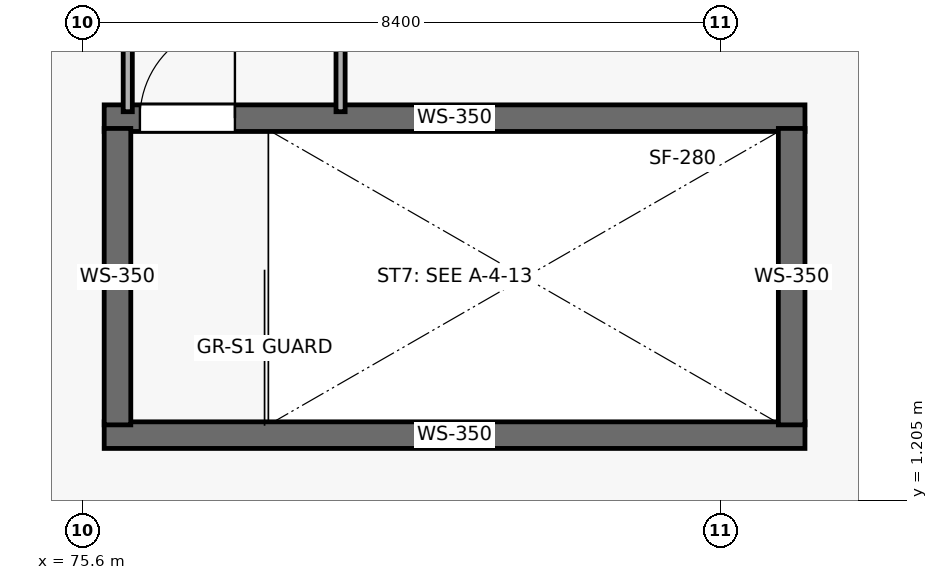
"""IFC4 building model, lengths in metres.
Left out: names, types, materials, properties, quantities, classifications, styles, units other than length and angle.
Written with IfcOpenShell. Run it as: python <this file> out.ifc"""

import sys

from ifc_helpers import new_model, si_unit, direction, frame, frame_2d, origin, place, context, subcontext, project, spatial, rectangle, extrude, element, fill, save


model = new_model("IFC4")
c1 = context("Model", 3, precision=1e-05, world=origin(), true_north=direction((0.0, 1.0)))
c2 = subcontext(c1, "Body", "Model", "MODEL_VIEW")
j1 = project(units=[si_unit("LENGTHUNIT", "METRE"), si_unit("PLANEANGLEUNIT", "RADIAN")], contexts=[c1])
p1 = place(None, origin())
s1 = spatial("IfcSite", under=j1, at=p1, CompositionType="ELEMENT")
p2 = place(p1, origin())
s2 = spatial("IfcBuilding", under=s1, at=p2, CompositionType="ELEMENT")
p3 = place(p2, frame((0.0, 0.0, 5.4)))
s3 = spatial("IfcBuildingStorey", under=s2, at=p3, CompositionType="ELEMENT", Elevation=5.4)
p4 = place(p3, frame((75.89, 2.065, 0.0), z_axis=(0.0, 0.0, 1.0), x_axis=(1.0, 0.0, 0.0)))
e1 = element("IfcWall", 1, at=p4, inside=s3, PredefinedType="SHEAR", context=c2, shape_type="SweptSolid", body=[
    extrude(rectangle(XDim=9.22, YDim=0.35, at=frame_2d((4.61, 0.0))), origin(), (0.0, 0.0, 1.0), 4.52),
])
p5 = place(p3, frame((85.11, 6.235, 0.0), z_axis=(0.0, 0.0, 1.0), x_axis=(-1.0, 0.0, 0.0)))
e2 = element("IfcWall", 2, at=p5, inside=s3, PredefinedType="SHEAR", context=c2, shape_type="SweptSolid", body=[
    extrude(rectangle(XDim=9.22, YDim=0.35, at=frame_2d((4.61, 0.0))), origin(), (0.0, 0.0, 1.0), 4.52),
])
p6 = place(p5, frame((7.5, 0.0, 0.0)))
e3 = element("IfcOpeningElement", 3, at=p6, cuts=e2, PredefinedType="OPENING", context=c2, shape_type="SweptSolid", body=[
    extrude(rectangle(XDim=1.25, YDim=2.2, at=frame_2d((0.625, 1.1))), frame((0.0, 0.185, 0.0), z_axis=(0.0, -1.0, 0.0), x_axis=(1.0, 0.0, 0.0)), (0.0, 0.0, 1.0), 0.37),
])
for number, where, z_axis, x_axis in (
    (4, (76.065, 2.2, 0.0), (0.0, 0.0, 1.0), (0.0, 1.0, 0.0)),
    (5, (84.935, 6.1, 0.0), (0.0, 0.0, 1.0), (0.0, -1.0, 0.0)),
):
    element("IfcWall", number, at=place(p3, frame(where, z_axis=z_axis, x_axis=x_axis)), inside=s3, PredefinedType="SHEAR", context=c2, shape_type="SweptSolid", body=[
        extrude(rectangle(XDim=3.9, YDim=0.35, at=frame_2d((1.95, 0.0))), origin(), (0.0, 0.0, 1.0), 4.52),
    ])
p7 = place(p3, frame((76.2, 9.06, 0.0), z_axis=(0.0, 0.0, 1.0), x_axis=(0.0, -1.0, 0.0)))
e6 = element("IfcWall", 6, at=p7, inside=s3, PredefinedType="PARTITIONING", context=c2, shape_type="SweptSolid", body=[
    extrude(rectangle(XDim=2.74, YDim=0.12, at=frame_2d((1.37, 0.0))), origin(), (0.0, 0.0, 1.0), 3.55),
])
p8 = place(p3, frame((79.0, 6.32, 0.0), z_axis=(0.0, 0.0, 1.0), x_axis=(0.0, 1.0, 0.0)))
e7 = element("IfcWall", 7, at=p8, inside=s3, PredefinedType="PARTITIONING", context=c2, shape_type="SweptSolid", body=[
    extrude(rectangle(XDim=2.74, YDim=0.12, at=frame_2d((1.37, 0.0))), origin(), (0.0, 0.0, 1.0), 4.52),
])
p9 = place(p6, origin())
e8 = element("IfcDoor", 8, at=p9, inside=s3, OperationType="SINGLE_SWING_RIGHT", PredefinedType="DOOR", context=c2, shape_type="SweptSolid", body=[
    extrude(rectangle(XDim=1.25, YDim=2.2, at=frame_2d((0.625, 1.1))), frame((0.0, 0.025, 0.0), z_axis=(0.0, -1.0, 0.0), x_axis=(1.0, 0.0, 0.0)), (0.0, 0.0, 1.0), 0.05),
])
fill(e3, e8)
save(model, sys.argv[1])
